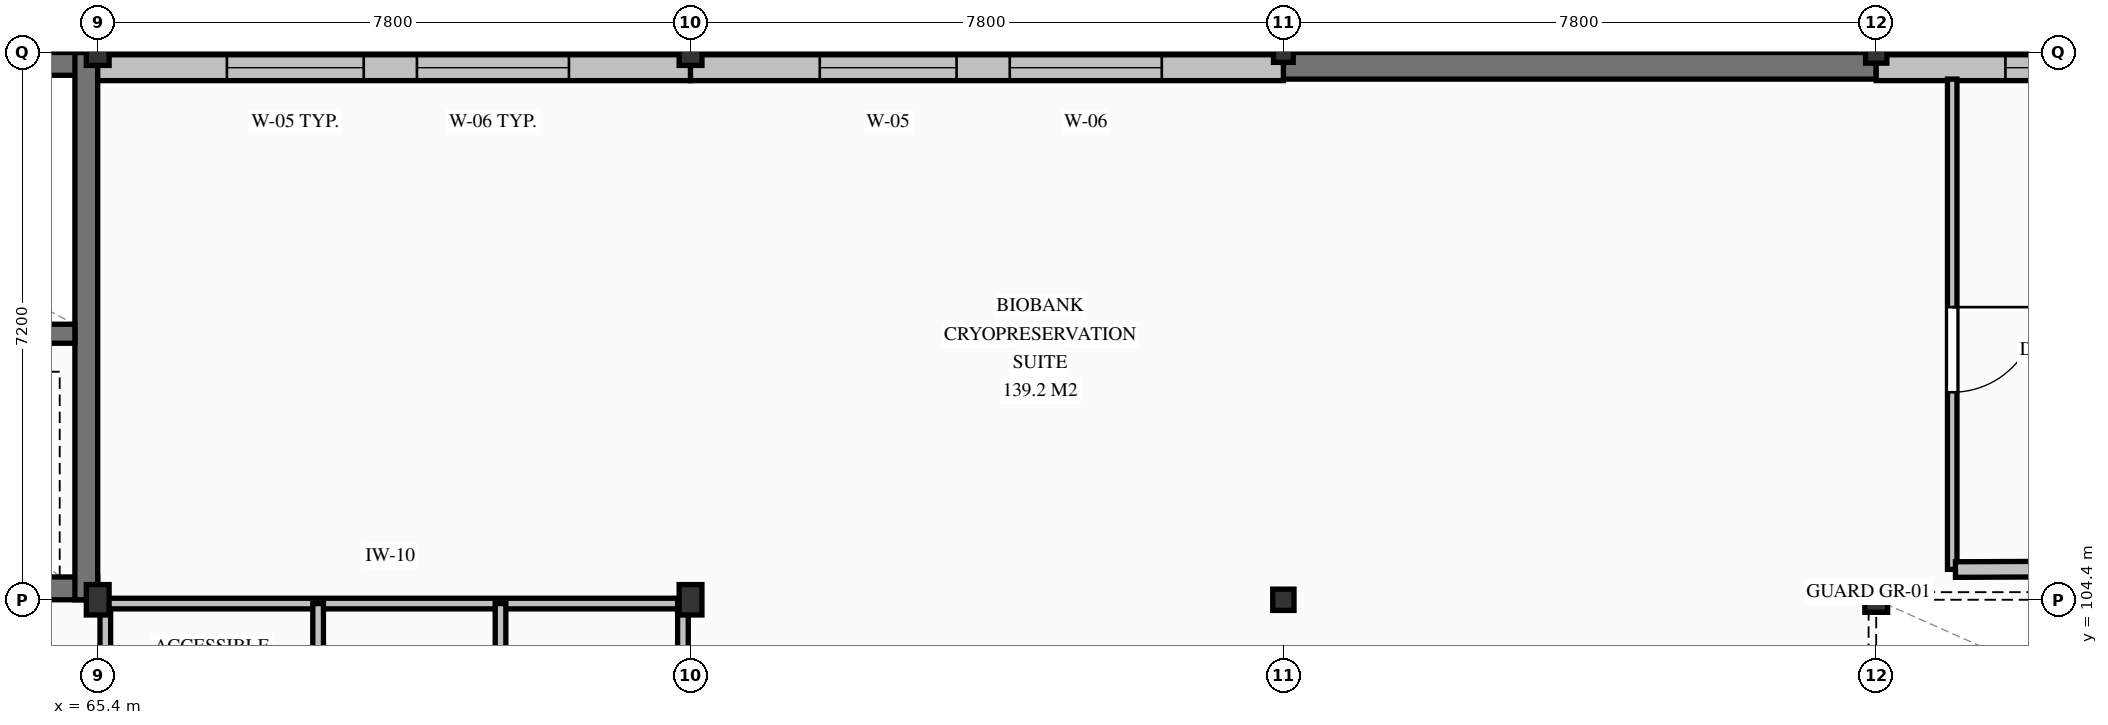
"""IFC4 building model, lengths in metres.
Left out: names, types, materials, properties, quantities, classifications, styles, units other than length and angle.
Written with IfcOpenShell. Run it as: python <this file> out.ifc"""

import sys

from ifc_helpers import new_model, si_unit, direction, frame, frame_2d, origin, origin_2d, place, context, subcontext, project, spatial, rectangle, i_section, extrude, element, fill, save


model = new_model("IFC4")
c1 = context("Model", 3, precision=1e-05, world=origin(), true_north=direction((0.0, 1.0)))
c2 = subcontext(c1, "Body", "Model", "MODEL_VIEW")
j1 = project(units=[si_unit("LENGTHUNIT", "METRE"), si_unit("PLANEANGLEUNIT", "RADIAN")], contexts=[c1])
p1 = place(None, origin())
s1 = spatial("IfcSite", under=j1, at=p1, CompositionType="ELEMENT")
p2 = place(p1, origin())
s2 = spatial("IfcBuilding", under=s1, at=p2, CompositionType="ELEMENT")
p3 = place(p2, frame((0.0, 0.0, 17.25)))
s3 = spatial("IfcBuildingStorey", under=s2, at=p3, CompositionType="ELEMENT", Elevation=17.25)
p4 = place(p3, frame((57.0, 111.45, 0.0), z_axis=(0.0, 0.0, 1.0), x_axis=(1.0, 0.0, 0.0)))
e1 = element("IfcWall", 1, at=p4, inside=s3, PredefinedType="SHEAR", context=c2, shape_type="SweptSolid", body=[
    extrude(rectangle(XDim=8.4, YDim=0.3, at=frame_2d((4.2, 0.0))), origin(), (0.0, 0.0, 1.0), 4.05),
])
p5 = place(p3, frame((57.0, 104.55, 0.0), z_axis=(0.0, 0.0, 1.0), x_axis=(1.0, 0.0, 0.0)))
e2 = element("IfcWall", 2, at=p5, inside=s3, PredefinedType="SHEAR", context=c2, shape_type="SweptSolid", body=[
    extrude(rectangle(XDim=8.4, YDim=0.3, at=frame_2d((4.2, 0.0))), origin(), (0.0, 0.0, 1.0), 4.05),
])
p6 = place(p5, frame((2.8, 0.0, 0.0)))
e3 = element("IfcOpeningElement", 3, at=p6, cuts=e2, PredefinedType="OPENING", context=c2, shape_type="SweptSolid", body=[
    extrude(rectangle(XDim=1.0, YDim=2.1, at=frame_2d((0.5, 1.05))), frame((0.0, 0.16, 0.0), z_axis=(0.0, -1.0, 0.0), x_axis=(1.0, 0.0, 0.0)), (0.0, 0.0, 1.0), 0.32),
])
p7 = place(p5, frame((5.85, 0.0, 0.0)))
e4 = element("IfcOpeningElement", 4, at=p7, cuts=e2, PredefinedType="OPENING", context=c2, shape_type="SweptSolid", body=[
    extrude(rectangle(XDim=1.2, YDim=2.15, at=frame_2d((0.6, 1.075))), frame((0.0, 0.16, 0.0), z_axis=(0.0, -1.0, 0.0), x_axis=(1.0, 0.0, 0.0)), (0.0, 0.0, 1.0), 0.32),
])
p8 = place(p3, frame((65.25, 104.4, 0.0), z_axis=(0.0, 0.0, 1.0), x_axis=(0.0, 1.0, 0.0)))
e5 = element("IfcWall", 5, at=p8, inside=s3, PredefinedType="SHEAR", context=c2, shape_type="SweptSolid", body=[
    extrude(rectangle(XDim=7.2, YDim=0.3, at=frame_2d((3.6, 0.0))), origin(), (0.0, 0.0, 1.0), 4.05),
])
p9 = place(p3, frame((57.3, 107.9, 0.0), z_axis=(0.0, 0.0, 1.0), x_axis=(1.0, 0.0, 0.0)))
e6 = element("IfcWall", 6, at=p9, inside=s3, PredefinedType="SHEAR", context=c2, shape_type="SweptSolid", body=[
    extrude(rectangle(XDim=7.8, YDim=0.25, at=frame_2d((3.9, 0.0))), origin(), (0.0, 0.0, 1.0), 4.05),
])
p10 = place(p3, frame((81.0, 111.425, 0.0), z_axis=(0.0, 0.0, 1.0), x_axis=(1.0, 0.0, 0.0)))
e7 = element("IfcWall", 7, at=p10, inside=s3, PredefinedType="SHEAR", context=c2, shape_type="SweptSolid", body=[
    extrude(rectangle(XDim=7.8, YDim=0.35, at=frame_2d((3.9, 0.0))), origin(), (0.0, 0.0, 1.0), 4.05),
])
p11 = place(p3, frame((65.4, 104.4, 0.0), z_axis=(0.0, 0.0, 1.0), x_axis=(1.0, 0.0, 0.0)))
e8 = element("IfcColumn", 8, at=p11, inside=s3, PredefinedType="COLUMN", context=c2, shape_type="SweptSolid", body=[
    extrude(i_section(OverallWidth=0.3, OverallDepth=0.4, WebThickness=0.013, FlangeThickness=0.024, FilletRadius=0.027, at=origin_2d()), origin(), (0.0, 0.0, 1.0), 4.05),
])
p12 = place(p3, frame((65.4, 111.6, 0.0), z_axis=(0.0, 0.0, 1.0), x_axis=(1.0, 0.0, 0.0)))
e9 = element("IfcColumn", 9, at=p12, inside=s3, PredefinedType="COLUMN", context=c2, shape_type="SweptSolid", body=[
    extrude(i_section(OverallWidth=0.3, OverallDepth=0.34, WebThickness=0.012, FlangeThickness=0.021, FilletRadius=0.027, at=origin_2d()), origin(), (0.0, 0.0, 1.0), 4.05),
])
p13 = place(p3, frame((73.2, 104.4, 0.0), z_axis=(0.0, 0.0, 1.0), x_axis=(1.0, 0.0, 0.0)))
e10 = element("IfcColumn", 10, at=p13, inside=s3, PredefinedType="COLUMN", context=c2, shape_type="SweptSolid", body=[
    extrude(i_section(OverallWidth=0.3, OverallDepth=0.4, WebThickness=0.013, FlangeThickness=0.024, FilletRadius=0.027, at=origin_2d()), origin(), (0.0, 0.0, 1.0), 4.05),
])
p14 = place(p3, frame((73.2, 111.6, 0.0), z_axis=(0.0, 0.0, 1.0), x_axis=(1.0, 0.0, 0.0)))
e11 = element("IfcColumn", 11, at=p14, inside=s3, PredefinedType="COLUMN", context=c2, shape_type="SweptSolid", body=[
    extrude(i_section(OverallWidth=0.3, OverallDepth=0.34, WebThickness=0.012, FlangeThickness=0.021, FilletRadius=0.027, at=origin_2d()), origin(), (0.0, 0.0, 1.0), 4.05),
])
p15 = place(p3, frame((81.0, 104.4, 0.0), z_axis=(0.0, 0.0, 1.0), x_axis=(1.0, 0.0, 0.0)))
e12 = element("IfcColumn", 12, at=p15, inside=s3, PredefinedType="COLUMN", context=c2, shape_type="SweptSolid", body=[
    extrude(i_section(OverallWidth=0.28, OverallDepth=0.28, WebThickness=0.01, FlangeThickness=0.018, FilletRadius=0.024, at=origin_2d()), origin(), (0.0, 0.0, 1.0), 4.05),
])
p16 = place(p3, frame((81.0, 111.6, 0.0), z_axis=(0.0, 0.0, 1.0), x_axis=(1.0, 0.0, 0.0)))
e13 = element("IfcColumn", 13, at=p16, inside=s3, PredefinedType="COLUMN", context=c2, shape_type="SweptSolid", body=[
    extrude(i_section(OverallWidth=0.26, OverallDepth=0.26, WebThickness=0.01, FlangeThickness=0.018, FilletRadius=0.024, at=origin_2d()), origin(), (0.0, 0.0, 1.0), 4.05),
])
p17 = place(p3, frame((88.8, 104.4, 0.0), z_axis=(0.0, 0.0, 1.0), x_axis=(1.0, 0.0, 0.0)))
e14 = element("IfcColumn", 14, at=p17, inside=s3, PredefinedType="COLUMN", context=c2, shape_type="SweptSolid", body=[
    extrude(i_section(OverallWidth=0.3, OverallDepth=0.33, WebThickness=0.01, FlangeThickness=0.017, FilletRadius=0.027, at=origin_2d()), origin(), (0.0, 0.0, 1.0), 4.05),
])
p18 = place(p3, frame((88.8, 111.6, 0.0), z_axis=(0.0, 0.0, 1.0), x_axis=(1.0, 0.0, 0.0)))
e15 = element("IfcColumn", 15, at=p18, inside=s3, PredefinedType="COLUMN", context=c2, shape_type="SweptSolid", body=[
    extrude(i_section(OverallWidth=0.28, OverallDepth=0.28, WebThickness=0.01, FlangeThickness=0.018, FilletRadius=0.024, at=origin_2d()), origin(), (0.0, 0.0, 1.0), 4.05),
])
p19 = place(p3, frame((65.4, 111.4, 0.0), z_axis=(0.0, 0.0, 1.0), x_axis=(1.0, 0.0, 0.0)))
e16 = element("IfcWall", 16, at=p19, inside=s3, PredefinedType="SOLIDWALL", context=c2, shape_type="SweptSolid", body=[
    extrude(rectangle(XDim=7.8, YDim=0.34, at=frame_2d((3.9, 0.0))), origin(), (0.0, 0.0, 1.0), 3.178),
])
p20 = place(p19, frame((1.7, 0.0, 0.85)))
e17 = element("IfcOpeningElement", 17, at=p20, cuts=e16, PredefinedType="OPENING", context=c2, shape_type="SweptSolid", body=[
    extrude(rectangle(XDim=1.8, YDim=1.95, at=frame_2d((0.9, 0.975))), frame((0.0, 0.18, 0.0), z_axis=(0.0, -1.0, 0.0), x_axis=(1.0, 0.0, 0.0)), (0.0, 0.0, 1.0), 0.36),
])
p21 = place(p19, frame((4.2, 0.0, 0.85)))
e18 = element("IfcOpeningElement", 18, at=p21, cuts=e16, PredefinedType="OPENING", context=c2, shape_type="SweptSolid", body=[
    extrude(rectangle(XDim=2.0, YDim=1.95, at=frame_2d((1.0, 0.975))), frame((0.0, 0.18, 0.0), z_axis=(0.0, -1.0, 0.0), x_axis=(1.0, 0.0, 0.0)), (0.0, 0.0, 1.0), 0.36),
])
p22 = place(p3, frame((73.2, 111.4, 0.0), z_axis=(0.0, 0.0, 1.0), x_axis=(1.0, 0.0, 0.0)))
e19 = element("IfcWall", 19, at=p22, inside=s3, PredefinedType="SOLIDWALL", context=c2, shape_type="SweptSolid", body=[
    extrude(rectangle(XDim=7.8, YDim=0.34, at=frame_2d((3.9, 0.0))), origin(), (0.0, 0.0, 1.0), 3.438),
])
p23 = place(p22, frame((1.7, 0.0, 0.85)))
e20 = element("IfcOpeningElement", 20, at=p23, cuts=e19, PredefinedType="OPENING", context=c2, shape_type="SweptSolid", body=[
    extrude(rectangle(XDim=1.8, YDim=1.95, at=frame_2d((0.9, 0.975))), frame((0.0, 0.18, 0.0), z_axis=(0.0, -1.0, 0.0), x_axis=(1.0, 0.0, 0.0)), (0.0, 0.0, 1.0), 0.36),
])
p24 = place(p22, frame((4.2, 0.0, 0.85)))
e21 = element("IfcOpeningElement", 21, at=p24, cuts=e19, PredefinedType="OPENING", context=c2, shape_type="SweptSolid", body=[
    extrude(rectangle(XDim=2.0, YDim=1.95, at=frame_2d((1.0, 0.975))), frame((0.0, 0.18, 0.0), z_axis=(0.0, -1.0, 0.0), x_axis=(1.0, 0.0, 0.0)), (0.0, 0.0, 1.0), 0.36),
])
p25 = place(p3, frame((88.8, 111.4, 0.0), z_axis=(0.0, 0.0, 1.0), x_axis=(1.0, 0.0, 0.0)))
e22 = element("IfcWall", 22, at=p25, inside=s3, PredefinedType="SOLIDWALL", context=c2, shape_type="SweptSolid", body=[
    extrude(rectangle(XDim=7.8, YDim=0.34, at=frame_2d((3.9, 0.0))), origin(), (0.0, 0.0, 1.0), 3.488),
])
p26 = place(p25, frame((1.7, 0.0, 0.85)))
e23 = element("IfcOpeningElement", 23, at=p26, cuts=e22, PredefinedType="OPENING", context=c2, shape_type="SweptSolid", body=[
    extrude(rectangle(XDim=1.8, YDim=1.95, at=frame_2d((0.9, 0.975))), frame((0.0, 0.18, 0.0), z_axis=(0.0, -1.0, 0.0), x_axis=(1.0, 0.0, 0.0)), (0.0, 0.0, 1.0), 0.36),
])
p27 = place(p25, frame((4.2, 0.0, 0.85)))
e24 = element("IfcOpeningElement", 24, at=p27, cuts=e22, PredefinedType="OPENING", context=c2, shape_type="SweptSolid", body=[
    extrude(rectangle(XDim=2.0, YDim=1.95, at=frame_2d((1.0, 0.975))), frame((0.0, 0.18, 0.0), z_axis=(0.0, -1.0, 0.0), x_axis=(1.0, 0.0, 0.0)), (0.0, 0.0, 1.0), 0.36),
])
p28 = place(p3, frame((65.5, 100.7, 0.0), z_axis=(0.0, 0.0, 1.0), x_axis=(0.0, 1.0, 0.0)))
e25 = element("IfcWall", 25, at=p28, inside=s3, PredefinedType="PARTITIONING", context=c2, shape_type="SweptSolid", body=[
    extrude(rectangle(XDim=3.68, YDim=0.14, at=frame_2d((1.84, 0.0))), origin(), (0.0, 0.0, 1.0), 3.178),
])
p29 = place(p3, frame((65.4, 104.35, 0.0), z_axis=(0.0, 0.0, 1.0), x_axis=(1.0, 0.0, 0.0)))
e26 = element("IfcWall", 26, at=p29, inside=s3, PredefinedType="PARTITIONING", context=c2, shape_type="SweptSolid", body=[
    extrude(rectangle(XDim=7.7, YDim=0.14, at=frame_2d((3.85, 0.0))), origin(), (0.0, 0.0, 1.0), 3.178),
])
p30 = place(p3, frame((73.1, 100.7, 0.0), z_axis=(0.0, 0.0, 1.0), x_axis=(0.0, 1.0, 0.0)))
e27 = element("IfcWall", 27, at=p30, inside=s3, PredefinedType="PARTITIONING", context=c2, shape_type="SweptSolid", body=[
    extrude(rectangle(XDim=3.65, YDim=0.14, at=frame_2d((1.825, 0.0))), origin(), (0.0, 0.0, 1.0), 3.368),
])
for number, where, z_axis, x_axis in (
    (28, (68.3, 100.7, 0.0), (0.0, 0.0, 1.0), (0.0, 1.0, 0.0)),
    (29, (70.7, 100.7, 0.0), (0.0, 0.0, 1.0), (0.0, 1.0, 0.0)),
):
    element("IfcWall", number, at=place(p3, frame(where, z_axis=z_axis, x_axis=x_axis)), inside=s3, PredefinedType="PARTITIONING", context=c2, shape_type="SweptSolid", body=[
        extrude(rectangle(XDim=3.65, YDim=0.14, at=frame_2d((1.825, 0.0))), origin(), (0.0, 0.0, 1.0), 3.448),
    ])
p31 = place(p3, frame((89.8, 111.25, 0.0), z_axis=(0.0, 0.0, 1.0), x_axis=(0.0, -1.0, 0.0)))
e30 = element("IfcWall", 30, at=p31, inside=s3, PredefinedType="PARTITIONING", context=c2, shape_type="SweptSolid", body=[
    extrude(rectangle(XDim=6.45, YDim=0.125, at=frame_2d((3.225, 0.0))), origin(), (0.0, 0.0, 1.0), 3.478),
])
p32 = place(p31, frame((3.0, 0.0, 0.0)))
e31 = element("IfcOpeningElement", 31, at=p32, cuts=e30, PredefinedType="OPENING", context=c2, shape_type="SweptSolid", body=[
    extrude(rectangle(XDim=1.12, YDim=2.18, at=frame_2d((0.56, 1.09))), frame((0.0, 0.073, 0.0), z_axis=(0.0, -1.0, 0.0), x_axis=(1.0, 0.0, 0.0)), (0.0, 0.0, 1.0), 0.145),
])
p33 = place(p3, frame((105.38, 104.87, 0.0), z_axis=(0.0, 0.0, 1.0), x_axis=(-0.999989037202, -0.004682464655, 0.0)))
e32 = element("IfcWall", 32, at=p33, inside=s3, PredefinedType="PARTITIONING", context=c2, shape_type="SweptSolid", body=[
    extrude(rectangle(XDim=15.538, YDim=0.205, at=frame_2d((7.769, 0.0))), origin(), (0.0, 0.0, 1.0), 3.328),
])
p34 = place(p20, origin())
e33 = element("IfcWindow", 33, at=p34, inside=s3, PartitioningType="SINGLE_PANEL", PredefinedType="WINDOW", context=c2, shape_type="SweptSolid", body=[
    extrude(rectangle(XDim=1.8, YDim=1.95, at=frame_2d((0.9, 0.975))), frame((0.0, 0.03, 0.0), z_axis=(0.0, -1.0, 0.0), x_axis=(1.0, 0.0, 0.0)), (0.0, 0.0, 1.0), 0.06),
])
fill(e17, e33)
p35 = place(p21, origin())
e34 = element("IfcWindow", 34, at=p35, inside=s3, PartitioningType="SINGLE_PANEL", PredefinedType="WINDOW", context=c2, shape_type="SweptSolid", body=[
    extrude(rectangle(XDim=2.0, YDim=1.95, at=frame_2d((1.0, 0.975))), frame((0.0, 0.03, 0.0), z_axis=(0.0, -1.0, 0.0), x_axis=(1.0, 0.0, 0.0)), (0.0, 0.0, 1.0), 0.06),
])
fill(e18, e34)
p36 = place(p23, origin())
e35 = element("IfcWindow", 35, at=p36, inside=s3, PartitioningType="SINGLE_PANEL", PredefinedType="WINDOW", context=c2, shape_type="SweptSolid", body=[
    extrude(rectangle(XDim=1.8, YDim=1.95, at=frame_2d((0.9, 0.975))), frame((0.0, 0.03, 0.0), z_axis=(0.0, -1.0, 0.0), x_axis=(1.0, 0.0, 0.0)), (0.0, 0.0, 1.0), 0.06),
])
fill(e20, e35)
p37 = place(p24, origin())
e36 = element("IfcWindow", 36, at=p37, inside=s3, PartitioningType="SINGLE_PANEL", PredefinedType="WINDOW", context=c2, shape_type="SweptSolid", body=[
    extrude(rectangle(XDim=2.0, YDim=1.95, at=frame_2d((1.0, 0.975))), frame((0.0, 0.03, 0.0), z_axis=(0.0, -1.0, 0.0), x_axis=(1.0, 0.0, 0.0)), (0.0, 0.0, 1.0), 0.06),
])
fill(e21, e36)
p38 = place(p26, origin())
e37 = element("IfcWindow", 37, at=p38, inside=s3, PartitioningType="SINGLE_PANEL", PredefinedType="WINDOW", context=c2, shape_type="SweptSolid", body=[
    extrude(rectangle(XDim=1.8, YDim=1.95, at=frame_2d((0.9, 0.975))), frame((0.0, 0.03, 0.0), z_axis=(0.0, -1.0, 0.0), x_axis=(1.0, 0.0, 0.0)), (0.0, 0.0, 1.0), 0.06),
])
fill(e23, e37)
p39 = place(p32, origin())
e38 = element("IfcDoor", 38, at=p39, inside=s3, OperationType="SINGLE_SWING_LEFT", PredefinedType="DOOR", context=c2, shape_type="SweptSolid", body=[
    extrude(rectangle(XDim=1.12, YDim=2.18, at=frame_2d((0.56, 1.09))), frame((0.0, 0.025, 0.0), z_axis=(0.0, -1.0, 0.0), x_axis=(1.0, 0.0, 0.0)), (0.0, 0.0, 1.0), 0.05),
])
fill(e31, e38)
save(model, sys.argv[1])
